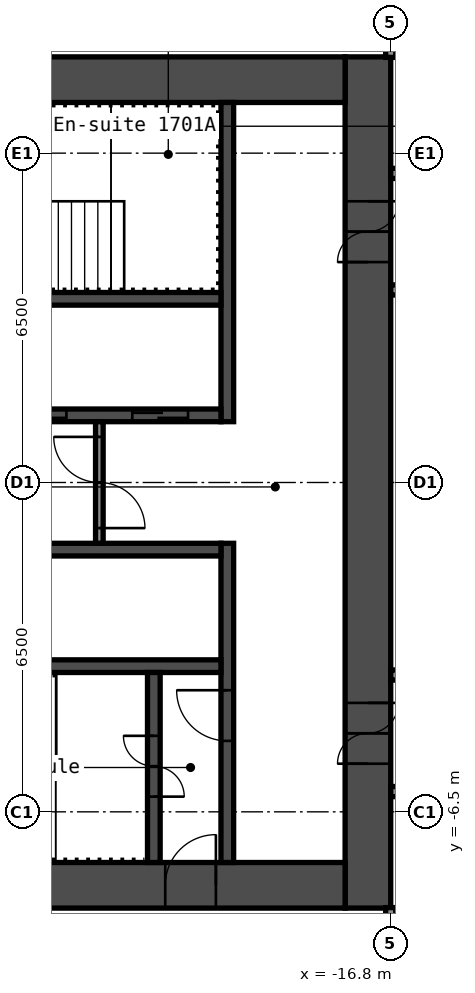
"""IFC4 building model, lengths in metres.
Left out: names, types, materials, properties, quantities, classifications, styles, units other than length and angle.
Written with IfcOpenShell. Run it as: python <this file> out.ifc"""

import sys

from ifc_helpers import new_model, si_unit, direction, frame, frame_2d, origin, place, context, subcontext, project, spatial, rectangle, extrude, element, fill, save


model = new_model("IFC4")
c1 = context("Model", 3, precision=1e-05, world=origin(), true_north=direction((0.0, 1.0)))
c2 = subcontext(c1, "Body", "Model", "MODEL_VIEW")
j1 = project(units=[si_unit("LENGTHUNIT", "METRE"), si_unit("PLANEANGLEUNIT", "RADIAN")], contexts=[c1])
p1 = place(None, origin())
s1 = spatial("IfcSite", under=j1, at=p1, CompositionType="ELEMENT")
p2 = place(p1, origin())
s2 = spatial("IfcBuilding", under=s1, at=p2, CompositionType="ELEMENT")
p3 = place(p2, frame((0.0, 0.0, 61.4)))
s3 = spatial("IfcBuildingStorey", under=s2, at=p3, CompositionType="ELEMENT", Elevation=61.4)
p4 = place(p3, frame((-17.25, -8.4, 0.0), z_axis=(0.0, 0.0, 1.0), x_axis=(0.0, 1.0, 0.0)))
e1 = element("IfcWall", 1, at=p4, inside=s3, PredefinedType="SHEAR", context=c2, shape_type="SweptSolid", body=[
    extrude(rectangle(XDim=16.8, YDim=0.9, at=frame_2d((8.4, 0.0))), origin(), (0.0, 0.0, 1.0), 2.9),
])
p5 = place(p4, frame((12.75, 0.0, 0.0)))
e2 = element("IfcOpeningElement", 2, at=p5, cuts=e1, PredefinedType="OPENING", context=c2, shape_type="SweptSolid", body=[
    extrude(rectangle(XDim=1.2, YDim=2.1, at=frame_2d((0.6, 1.05))), frame((0.0, 0.46, 0.0), z_axis=(0.0, -1.0, 0.0), x_axis=(1.0, 0.0, 0.0)), (0.0, 0.0, 1.0), 0.92),
])
p6 = place(p4, frame((2.85, 0.0, 0.0)))
e3 = element("IfcOpeningElement", 3, at=p6, cuts=e1, PredefinedType="OPENING", context=c2, shape_type="SweptSolid", body=[
    extrude(rectangle(XDim=1.2, YDim=2.1, at=frame_2d((0.6, 1.05))), frame((0.0, 0.46, 0.0), z_axis=(0.0, -1.0, 0.0), x_axis=(1.0, 0.0, 0.0)), (0.0, 0.0, 1.0), 0.92),
])
p7 = place(p3, frame((-32.7, 7.95, 0.0), z_axis=(0.0, 0.0, 1.0), x_axis=(1.0, 0.0, 0.0)))
e4 = element("IfcWall", 4, at=p7, inside=s3, PredefinedType="SHEAR", context=c2, shape_type="SweptSolid", body=[
    extrude(rectangle(XDim=15.0, YDim=0.9, at=frame_2d((7.5, 0.0))), origin(), (0.0, 0.0, 1.0), 2.9),
])
p8 = place(p7, frame((3.4, 0.0, 0.0)))
e5 = element("IfcOpeningElement", 5, at=p8, cuts=e4, PredefinedType="OPENING", context=c2, shape_type="SweptSolid", body=[
    extrude(rectangle(XDim=1.2, YDim=2.1, at=frame_2d((0.6, 1.05))), frame((0.0, 0.46, 0.0), z_axis=(0.0, -1.0, 0.0), x_axis=(1.0, 0.0, 0.0)), (0.0, 0.0, 1.0), 0.92),
])
p9 = place(p7, frame((0.75, 0.0, 0.0)))
e6 = element("IfcOpeningElement", 6, at=p9, cuts=e4, PredefinedType="OPENING", context=c2, shape_type="SweptSolid", body=[
    extrude(rectangle(XDim=0.9, YDim=2.1, at=frame_2d((0.45, 1.05))), frame((0.0, 0.46, 0.0), z_axis=(0.0, -1.0, 0.0), x_axis=(1.0, 0.0, 0.0)), (0.0, 0.0, 1.0), 0.92),
])
p10 = place(p3, frame((-32.7, -7.95, 0.0), z_axis=(0.0, 0.0, 1.0), x_axis=(1.0, 0.0, 0.0)))
e7 = element("IfcWall", 7, at=p10, inside=s3, PredefinedType="SHEAR", context=c2, shape_type="SweptSolid", body=[
    extrude(rectangle(XDim=15.0, YDim=0.9, at=frame_2d((7.5, 0.0))), origin(), (0.0, 0.0, 1.0), 2.9),
])
p11 = place(p10, frame((11.45, 0.0, 0.0)))
e8 = element("IfcOpeningElement", 8, at=p11, cuts=e7, PredefinedType="OPENING", context=c2, shape_type="SweptSolid", body=[
    extrude(rectangle(XDim=1.0, YDim=2.1, at=frame_2d((0.5, 1.05))), frame((0.0, 0.46, 0.0), z_axis=(0.0, -1.0, 0.0), x_axis=(1.0, 0.0, 0.0)), (0.0, 0.0, 1.0), 0.92),
])
p12 = place(p3, frame((-20.025, 1.2, 0.0), z_axis=(0.0, 0.0, 1.0), x_axis=(0.0, 1.0, 0.0)))
e9 = element("IfcWall", 9, at=p12, inside=s3, PredefinedType="SHEAR", context=c2, shape_type="SweptSolid", body=[
    extrude(rectangle(XDim=6.3, YDim=0.25, at=frame_2d((3.15, 0.0))), origin(), (0.0, 0.0, 1.0), 2.9),
])
p13 = place(p3, frame((-20.025, -7.5, 0.0), z_axis=(0.0, 0.0, 1.0), x_axis=(0.0, 1.0, 0.0)))
e10 = element("IfcWall", 10, at=p13, inside=s3, PredefinedType="SHEAR", context=c2, shape_type="SweptSolid", body=[
    extrude(rectangle(XDim=6.3, YDim=0.25, at=frame_2d((3.15, 0.0))), origin(), (0.0, 0.0, 1.0), 2.9),
])
p14 = place(p13, frame((2.4, 0.0, 0.0)))
e11 = element("IfcOpeningElement", 11, at=p14, cuts=e10, PredefinedType="OPENING", context=c2, shape_type="SweptSolid", body=[
    extrude(rectangle(XDim=1.0, YDim=2.1, at=frame_2d((0.5, 1.05))), frame((0.0, 0.135, 0.0), z_axis=(0.0, -1.0, 0.0), x_axis=(1.0, 0.0, 0.0)), (0.0, 0.0, 1.0), 0.27),
])
p15 = place(p3, frame((-27.65, 1.325, 0.0), z_axis=(0.0, 0.0, 1.0), x_axis=(1.0, 0.0, 0.0)))
e12 = element("IfcWall", 12, at=p15, inside=s3, PredefinedType="SHEAR", context=c2, shape_type="SweptSolid", body=[
    extrude(rectangle(XDim=7.5, YDim=0.25, at=frame_2d((3.75, 0.0))), origin(), (0.0, 0.0, 1.0), 2.9),
])
p16 = place(p15, frame((5.75, 0.0, 0.0)))
e13 = element("IfcOpeningElement", 13, at=p16, cuts=e12, PredefinedType="OPENING", context=c2, shape_type="SweptSolid", body=[
    extrude(rectangle(XDim=1.1, YDim=2.1, at=frame_2d((0.55, 1.05))), frame((0.0, 0.135, 0.0), z_axis=(0.0, -1.0, 0.0), x_axis=(1.0, 0.0, 0.0)), (0.0, 0.0, 1.0), 0.27),
])
p17 = place(p15, frame((3.35, 0.0, 0.0)))
e14 = element("IfcOpeningElement", 14, at=p17, cuts=e12, PredefinedType="OPENING", context=c2, shape_type="SweptSolid", body=[
    extrude(rectangle(XDim=1.1, YDim=2.1, at=frame_2d((0.55, 1.05))), frame((0.0, 0.135, 0.0), z_axis=(0.0, -1.0, 0.0), x_axis=(1.0, 0.0, 0.0)), (0.0, 0.0, 1.0), 0.27),
])
p18 = place(p15, frame((0.95, 0.0, 0.0)))
e15 = element("IfcOpeningElement", 15, at=p18, cuts=e12, PredefinedType="OPENING", context=c2, shape_type="SweptSolid", body=[
    extrude(rectangle(XDim=1.1, YDim=2.1, at=frame_2d((0.55, 1.05))), frame((0.0, 0.135, 0.0), z_axis=(0.0, -1.0, 0.0), x_axis=(1.0, 0.0, 0.0)), (0.0, 0.0, 1.0), 0.27),
])
for number, where, z_axis, x_axis in (
    (16, (-27.65, 3.625, 0.0), (0.0, 0.0, 1.0), (1.0, 0.0, 0.0)),
    (17, (-27.65, -1.325, 0.0), (0.0, 0.0, 1.0), (1.0, 0.0, 0.0)),
    (18, (-27.65, -3.625, 0.0), (0.0, 0.0, 1.0), (1.0, 0.0, 0.0)),
):
    element("IfcWall", number, at=place(p3, frame(where, z_axis=z_axis, x_axis=x_axis)), inside=s3, PredefinedType="SHEAR", context=c2, shape_type="SweptSolid", body=[
        extrude(rectangle(XDim=7.5, YDim=0.25, at=frame_2d((3.75, 0.0))), origin(), (0.0, 0.0, 1.0), 2.9),
    ])
p19 = place(p3, frame((-21.475, -7.5, 0.0), z_axis=(0.0, 0.0, 1.0), x_axis=(0.0, 1.0, 0.0)))
e19 = element("IfcWall", 19, at=p19, inside=s3, PredefinedType="SHEAR", context=c2, shape_type="SweptSolid", body=[
    extrude(rectangle(XDim=3.75, YDim=0.25, at=frame_2d((1.875, 0.0))), origin(), (0.0, 0.0, 1.0), 2.9),
])
p20 = place(p19, frame((1.3, 0.0, 0.0)))
e20 = element("IfcOpeningElement", 20, at=p20, cuts=e19, PredefinedType="OPENING", context=c2, shape_type="SweptSolid", body=[
    extrude(rectangle(XDim=1.2, YDim=2.1, at=frame_2d((0.6, 1.05))), frame((0.0, 0.135, 0.0), z_axis=(0.0, -1.0, 0.0), x_axis=(1.0, 0.0, 0.0)), (0.0, 0.0, 1.0), 0.27),
])
p21 = place(p3, frame((-22.55, -1.2, 0.0), z_axis=(0.0, 0.0, 1.0), x_axis=(0.0, 1.0, 0.0)))
e21 = element("IfcWall", 21, at=p21, inside=s3, PredefinedType="PARTITIONING", context=c2, shape_type="SweptSolid", body=[
    extrude(rectangle(XDim=2.4, YDim=0.15, at=frame_2d((1.2, 0.0))), origin(), (0.0, 0.0, 1.0), 2.9),
])
p22 = place(p21, frame((0.3, 0.0, 0.0)))
e22 = element("IfcOpeningElement", 22, at=p22, cuts=e21, PredefinedType="OPENING", context=c2, shape_type="SweptSolid", body=[
    extrude(rectangle(XDim=1.8, YDim=2.1, at=frame_2d((0.9, 1.05))), frame((0.0, 0.085, 0.0), z_axis=(0.0, -1.0, 0.0), x_axis=(1.0, 0.0, 0.0)), (0.0, 0.0, 1.0), 0.17),
])
p23 = place(p3, frame((-16.8, -6.1, 0.0), z_axis=(0.0, 0.0, 1.0), x_axis=(1.0, 0.0, 0.0)))
e23 = element("IfcWall", 23, at=p23, inside=s3, PredefinedType="PARTITIONING", context=c2, shape_type="SweptSolid", body=[
    extrude(rectangle(XDim=33.6, YDim=0.2, at=frame_2d((16.8, 0.0))), origin(), (0.0, 0.0, 1.0), 2.9),
])
p24 = place(p23, frame((2.85, 0.0, 0.0)))
e24 = element("IfcOpeningElement", 24, at=p24, cuts=e23, PredefinedType="OPENING", context=c2, shape_type="SweptSolid", body=[
    extrude(rectangle(XDim=1.0, YDim=2.1, at=frame_2d((0.5, 1.05))), frame((0.0, 0.11, 0.0), z_axis=(0.0, -1.0, 0.0), x_axis=(1.0, 0.0, 0.0)), (0.0, 0.0, 1.0), 0.22),
])
p25 = place(p23, frame((4.55, 0.0, 0.0)))
e25 = element("IfcOpeningElement", 25, at=p25, cuts=e23, PredefinedType="OPENING", context=c2, shape_type="SweptSolid", body=[
    extrude(rectangle(XDim=1.0, YDim=2.1, at=frame_2d((0.5, 1.05))), frame((0.0, 0.11, 0.0), z_axis=(0.0, -1.0, 0.0), x_axis=(1.0, 0.0, 0.0)), (0.0, 0.0, 1.0), 0.22),
])
p26 = place(p23, frame((12.1, 0.0, 0.0)))
e26 = element("IfcOpeningElement", 26, at=p26, cuts=e23, PredefinedType="OPENING", context=c2, shape_type="SweptSolid", body=[
    extrude(rectangle(XDim=1.0, YDim=2.1, at=frame_2d((0.5, 1.05))), frame((0.0, 0.11, 0.0), z_axis=(0.0, -1.0, 0.0), x_axis=(1.0, 0.0, 0.0)), (0.0, 0.0, 1.0), 0.22),
])
p27 = place(p23, frame((19.65, 0.0, 0.0)))
e27 = element("IfcOpeningElement", 27, at=p27, cuts=e23, PredefinedType="OPENING", context=c2, shape_type="SweptSolid", body=[
    extrude(rectangle(XDim=1.0, YDim=2.1, at=frame_2d((0.5, 1.05))), frame((0.0, 0.11, 0.0), z_axis=(0.0, -1.0, 0.0), x_axis=(1.0, 0.0, 0.0)), (0.0, 0.0, 1.0), 0.22),
])
p28 = place(p23, frame((21.35, 0.0, 0.0)))
e28 = element("IfcOpeningElement", 28, at=p28, cuts=e23, PredefinedType="OPENING", context=c2, shape_type="SweptSolid", body=[
    extrude(rectangle(XDim=1.0, YDim=2.1, at=frame_2d((0.5, 1.05))), frame((0.0, 0.11, 0.0), z_axis=(0.0, -1.0, 0.0), x_axis=(1.0, 0.0, 0.0)), (0.0, 0.0, 1.0), 0.22),
])
p29 = place(p23, frame((30.6, 0.0, 0.0)))
e29 = element("IfcOpeningElement", 29, at=p29, cuts=e23, PredefinedType="OPENING", context=c2, shape_type="SweptSolid", body=[
    extrude(rectangle(XDim=1.0, YDim=2.1, at=frame_2d((0.5, 1.05))), frame((0.0, 0.11, 0.0), z_axis=(0.0, -1.0, 0.0), x_axis=(1.0, 0.0, 0.0)), (0.0, 0.0, 1.0), 0.22),
])
p30 = place(p3, frame((-16.8, -3.8, 0.0), z_axis=(0.0, 0.0, 1.0), x_axis=(1.0, 0.0, 0.0)))
e30 = element("IfcWall", 30, at=p30, inside=s3, PredefinedType="PARTITIONING", context=c2, shape_type="SweptSolid", body=[
    extrude(rectangle(XDim=33.6, YDim=0.2, at=frame_2d((16.8, 0.0))), origin(), (0.0, 0.0, 1.0), 2.9),
])
p31 = place(p30, frame((9.545, 0.0, 0.0)))
e31 = element("IfcOpeningElement", 31, at=p31, cuts=e30, PredefinedType="OPENING", context=c2, shape_type="SweptSolid", body=[
    extrude(rectangle(XDim=0.9, YDim=2.1, at=frame_2d((0.45, 1.05))), frame((0.0, 0.11, 0.0), z_axis=(0.0, -1.0, 0.0), x_axis=(1.0, 0.0, 0.0)), (0.0, 0.0, 1.0), 0.22),
])
p32 = place(p30, frame((13.745, 0.0, 0.0)))
e32 = element("IfcOpeningElement", 32, at=p32, cuts=e30, PredefinedType="OPENING", context=c2, shape_type="SweptSolid", body=[
    extrude(rectangle(XDim=0.9, YDim=2.1, at=frame_2d((0.45, 1.05))), frame((0.0, 0.11, 0.0), z_axis=(0.0, -1.0, 0.0), x_axis=(1.0, 0.0, 0.0)), (0.0, 0.0, 1.0), 0.22),
])
p33 = place(p30, frame((27.1, 0.0, 0.0)))
e33 = element("IfcOpeningElement", 33, at=p33, cuts=e30, PredefinedType="OPENING", context=c2, shape_type="SweptSolid", body=[
    extrude(rectangle(XDim=0.9, YDim=2.1, at=frame_2d((0.45, 1.05))), frame((0.0, 0.11, 0.0), z_axis=(0.0, -1.0, 0.0), x_axis=(1.0, 0.0, 0.0)), (0.0, 0.0, 1.0), 0.22),
])
p34 = place(p30, frame((31.3, 0.0, 0.0)))
e34 = element("IfcOpeningElement", 34, at=p34, cuts=e30, PredefinedType="OPENING", context=c2, shape_type="SweptSolid", body=[
    extrude(rectangle(XDim=0.9, YDim=2.1, at=frame_2d((0.45, 1.05))), frame((0.0, 0.11, 0.0), z_axis=(0.0, -1.0, 0.0), x_axis=(1.0, 0.0, 0.0)), (0.0, 0.0, 1.0), 0.22),
])
p35 = place(p3, frame((-16.8, 3.8, 0.0), z_axis=(0.0, 0.0, 1.0), x_axis=(1.0, 0.0, 0.0)))
e35 = element("IfcWall", 35, at=p35, inside=s3, PredefinedType="PARTITIONING", context=c2, shape_type="SweptSolid", body=[
    extrude(rectangle(XDim=33.6, YDim=0.2, at=frame_2d((16.8, 0.0))), origin(), (0.0, 0.0, 1.0), 2.9),
])
p36 = place(p35, frame((1.315, 0.0, 0.0)))
e36 = element("IfcOpeningElement", 36, at=p36, cuts=e35, PredefinedType="OPENING", context=c2, shape_type="SweptSolid", body=[
    extrude(rectangle(XDim=0.9, YDim=2.1, at=frame_2d((0.45, 1.05))), frame((0.0, 0.11, 0.0), z_axis=(0.0, -1.0, 0.0), x_axis=(1.0, 0.0, 0.0)), (0.0, 0.0, 1.0), 0.22),
])
p37 = place(p35, frame((5.515, 0.0, 0.0)))
e37 = element("IfcOpeningElement", 37, at=p37, cuts=e35, PredefinedType="OPENING", context=c2, shape_type="SweptSolid", body=[
    extrude(rectangle(XDim=0.9, YDim=2.1, at=frame_2d((0.45, 1.05))), frame((0.0, 0.11, 0.0), z_axis=(0.0, -1.0, 0.0), x_axis=(1.0, 0.0, 0.0)), (0.0, 0.0, 1.0), 0.22),
])
p38 = place(p35, frame((18.03, 0.0, 0.0)))
e38 = element("IfcOpeningElement", 38, at=p38, cuts=e35, PredefinedType="OPENING", context=c2, shape_type="SweptSolid", body=[
    extrude(rectangle(XDim=0.9, YDim=2.1, at=frame_2d((0.45, 1.05))), frame((0.0, 0.11, 0.0), z_axis=(0.0, -1.0, 0.0), x_axis=(1.0, 0.0, 0.0)), (0.0, 0.0, 1.0), 0.22),
])
p39 = place(p35, frame((22.23, 0.0, 0.0)))
e39 = element("IfcOpeningElement", 39, at=p39, cuts=e35, PredefinedType="OPENING", context=c2, shape_type="SweptSolid", body=[
    extrude(rectangle(XDim=0.9, YDim=2.1, at=frame_2d((0.45, 1.05))), frame((0.0, 0.11, 0.0), z_axis=(0.0, -1.0, 0.0), x_axis=(1.0, 0.0, 0.0)), (0.0, 0.0, 1.0), 0.22),
])
p40 = place(p3, frame((-16.8, 6.1, 0.0), z_axis=(0.0, 0.0, 1.0), x_axis=(1.0, 0.0, 0.0)))
e40 = element("IfcWall", 40, at=p40, inside=s3, PredefinedType="PARTITIONING", context=c2, shape_type="SweptSolid", body=[
    extrude(rectangle(XDim=33.6, YDim=0.2, at=frame_2d((16.8, 0.0))), origin(), (0.0, 0.0, 1.0), 2.9),
])
p41 = place(p40, frame((2.85, 0.0, 0.0)))
e41 = element("IfcOpeningElement", 41, at=p41, cuts=e40, PredefinedType="OPENING", context=c2, shape_type="SweptSolid", body=[
    extrude(rectangle(XDim=1.0, YDim=2.1, at=frame_2d((0.5, 1.05))), frame((0.0, 0.11, 0.0), z_axis=(0.0, -1.0, 0.0), x_axis=(1.0, 0.0, 0.0)), (0.0, 0.0, 1.0), 0.22),
])
p42 = place(p40, frame((4.55, 0.0, 0.0)))
e42 = element("IfcOpeningElement", 42, at=p42, cuts=e40, PredefinedType="OPENING", context=c2, shape_type="SweptSolid", body=[
    extrude(rectangle(XDim=1.0, YDim=2.1, at=frame_2d((0.5, 1.05))), frame((0.0, 0.11, 0.0), z_axis=(0.0, -1.0, 0.0), x_axis=(1.0, 0.0, 0.0)), (0.0, 0.0, 1.0), 0.22),
])
p43 = place(p40, frame((10.4, 0.0, 0.0)))
e43 = element("IfcOpeningElement", 43, at=p43, cuts=e40, PredefinedType="OPENING", context=c2, shape_type="SweptSolid", body=[
    extrude(rectangle(XDim=1.0, YDim=2.1, at=frame_2d((0.5, 1.05))), frame((0.0, 0.11, 0.0), z_axis=(0.0, -1.0, 0.0), x_axis=(1.0, 0.0, 0.0)), (0.0, 0.0, 1.0), 0.22),
])
p44 = place(p40, frame((22.3, 0.0, 0.0)))
e44 = element("IfcOpeningElement", 44, at=p44, cuts=e40, PredefinedType="OPENING", context=c2, shape_type="SweptSolid", body=[
    extrude(rectangle(XDim=1.0, YDim=2.1, at=frame_2d((0.5, 1.05))), frame((0.0, 0.11, 0.0), z_axis=(0.0, -1.0, 0.0), x_axis=(1.0, 0.0, 0.0)), (0.0, 0.0, 1.0), 0.22),
])
p45 = place(p40, frame((30.6, 0.0, 0.0)))
e45 = element("IfcOpeningElement", 45, at=p45, cuts=e40, PredefinedType="OPENING", context=c2, shape_type="SweptSolid", body=[
    extrude(rectangle(XDim=1.0, YDim=2.1, at=frame_2d((0.5, 1.05))), frame((0.0, 0.11, 0.0), z_axis=(0.0, -1.0, 0.0), x_axis=(1.0, 0.0, 0.0)), (0.0, 0.0, 1.0), 0.22),
])
for number, where, z_axis, x_axis in (
    (46, (-16.8, -20.3, 0.0), (0.0, 0.0, 1.0), (0.0, 1.0, 0.0)),
    (47, (-16.8, 8.39, 0.0), (0.0, 0.0, 1.0), (0.0, 1.0, 0.0)),
):
    element("IfcWall", number, at=place(p3, frame(where, z_axis=z_axis, x_axis=x_axis)), inside=s3, PredefinedType="PARTITIONING", context=c2, shape_type="SweptSolid", body=[
        extrude(rectangle(XDim=11.91, YDim=0.2, at=frame_2d((5.955, 0.0))), origin(), (0.0, 0.0, 1.0), 2.9),
    ])
p46 = place(p5, origin())
e48 = element("IfcDoor", 48, at=p46, inside=s3, OperationType="DOUBLE_DOOR_SINGLE_SWING", PredefinedType="DOOR", context=c2, shape_type="SweptSolid", body=[
    extrude(rectangle(XDim=1.2, YDim=2.1, at=frame_2d((0.6, 1.05))), frame((0.0, 0.025, 0.0), z_axis=(0.0, -1.0, 0.0), x_axis=(1.0, 0.0, 0.0)), (0.0, 0.0, 1.0), 0.05),
])
fill(e2, e48)
p47 = place(p6, origin())
e49 = element("IfcDoor", 49, at=p47, inside=s3, OperationType="DOUBLE_DOOR_SINGLE_SWING", PredefinedType="DOOR", context=c2, shape_type="SweptSolid", body=[
    extrude(rectangle(XDim=1.2, YDim=2.1, at=frame_2d((0.6, 1.05))), frame((0.0, 0.025, 0.0), z_axis=(0.0, -1.0, 0.0), x_axis=(1.0, 0.0, 0.0)), (0.0, 0.0, 1.0), 0.05),
])
fill(e3, e49)
p48 = place(p11, origin())
e50 = element("IfcDoor", 50, at=p48, inside=s3, OperationType="SINGLE_SWING_LEFT", PredefinedType="DOOR", context=c2, shape_type="SweptSolid", body=[
    extrude(rectangle(XDim=1.0, YDim=2.1, at=frame_2d((0.5, 1.05))), frame((0.0, 0.025, 0.0), z_axis=(0.0, -1.0, 0.0), x_axis=(1.0, 0.0, 0.0)), (0.0, 0.0, 1.0), 0.05),
])
fill(e8, e50)
p49 = place(p20, origin())
e51 = element("IfcDoor", 51, at=p49, inside=s3, OperationType="DOUBLE_DOOR_SINGLE_SWING", PredefinedType="DOOR", context=c2, shape_type="SweptSolid", body=[
    extrude(rectangle(XDim=1.2, YDim=2.1, at=frame_2d((0.6, 1.05))), frame((0.0, 0.025, 0.0), z_axis=(0.0, -1.0, 0.0), x_axis=(1.0, 0.0, 0.0)), (0.0, 0.0, 1.0), 0.05),
])
fill(e20, e51)
p50 = place(p14, origin())
e52 = element("IfcDoor", 52, at=p50, inside=s3, OperationType="SINGLE_SWING_LEFT", PredefinedType="DOOR", context=c2, shape_type="SweptSolid", body=[
    extrude(rectangle(XDim=1.0, YDim=2.1, at=frame_2d((0.5, 1.05))), frame((0.0, 0.025, 0.0), z_axis=(0.0, -1.0, 0.0), x_axis=(1.0, 0.0, 0.0)), (0.0, 0.0, 1.0), 0.05),
])
fill(e11, e52)
p51 = place(p22, origin())
e53 = element("IfcDoor", 53, at=p51, inside=s3, OperationType="DOUBLE_DOOR_SINGLE_SWING", PredefinedType="DOOR", context=c2, shape_type="SweptSolid", body=[
    extrude(rectangle(XDim=1.8, YDim=2.1, at=frame_2d((0.9, 1.05))), frame((0.0, 0.025, 0.0), z_axis=(0.0, -1.0, 0.0), x_axis=(1.0, 0.0, 0.0)), (0.0, 0.0, 1.0), 0.05),
])
fill(e22, e53)
p52 = place(p16, origin())
e54 = element("IfcDoor", 54, at=p52, inside=s3, OperationType="DOUBLE_DOOR_SLIDING", PredefinedType="DOOR", context=c2, shape_type="SweptSolid", body=[
    extrude(rectangle(XDim=1.1, YDim=2.1, at=frame_2d((0.55, 1.05))), frame((0.0, 0.025, 0.0), z_axis=(0.0, -1.0, 0.0), x_axis=(1.0, 0.0, 0.0)), (0.0, 0.0, 1.0), 0.05),
])
fill(e13, e54)
p53 = place(p17, origin())
e55 = element("IfcDoor", 55, at=p53, inside=s3, OperationType="DOUBLE_DOOR_SLIDING", PredefinedType="DOOR", context=c2, shape_type="SweptSolid", body=[
    extrude(rectangle(XDim=1.1, YDim=2.1, at=frame_2d((0.55, 1.05))), frame((0.0, 0.025, 0.0), z_axis=(0.0, -1.0, 0.0), x_axis=(1.0, 0.0, 0.0)), (0.0, 0.0, 1.0), 0.05),
])
fill(e14, e55)
save(model, sys.argv[1])
